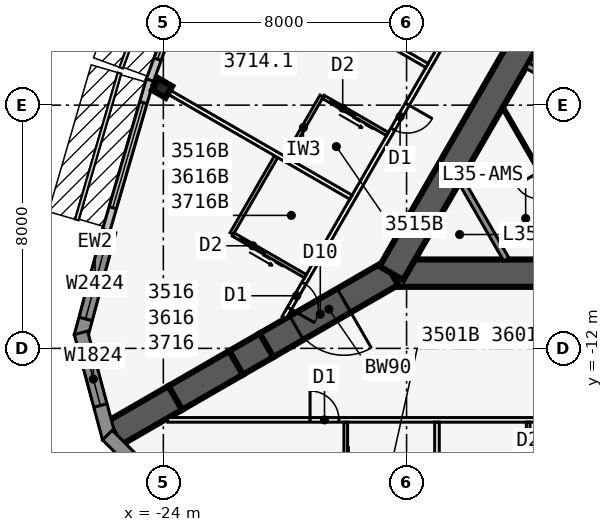
"""IFC4 building model, lengths in metres.
Left out: names, types, materials, properties, quantities, classifications, styles, units other than length and angle.
Written with IfcOpenShell. Run it as: python <this file> out.ifc"""

import sys

from ifc_helpers import new_model, si_unit, direction, frame, frame_2d, origin, origin_2d, place, context, subcontext, project, spatial, polyline, rectangle, i_section, outline, extrude, element, fill, save


model = new_model("IFC4")
c1 = context("Model", 3, precision=1e-05, world=origin(), true_north=direction((0.0, 1.0)))
c2 = subcontext(c1, "Body", "Model", "MODEL_VIEW")
j1 = project(units=[si_unit("LENGTHUNIT", "METRE"), si_unit("PLANEANGLEUNIT", "RADIAN")], contexts=[c1])
p1 = place(None, origin())
s1 = spatial("IfcSite", under=j1, at=p1, CompositionType="ELEMENT")
p2 = place(p1, origin())
s2 = spatial("IfcBuilding", under=s1, at=p2, CompositionType="ELEMENT")
p3 = place(p2, frame((0.0, 0.0, 135.1)))
s3 = spatial("IfcBuildingStorey", under=s2, at=p3, CompositionType="ELEMENT", Elevation=135.1)
p4 = place(p3, frame((-16.5, -9.526, 0.0), z_axis=(0.0, 0.0, 1.0), x_axis=(1.0, 0.0, 0.0)))
e1 = element("IfcWall", 1, at=p4, inside=s3, PredefinedType="SHEAR", context=c2, shape_type="SweptSolid", body=[
    extrude(rectangle(XDim=33.0, YDim=0.9, at=frame_2d((16.5, 0.0))), origin(), (0.0, 0.0, 1.0), 3.4),
])
p5 = place(p4, frame((14.05, 0.0, 0.0)))
e2 = element("IfcOpeningElement", 2, at=p5, cuts=e1, PredefinedType="OPENING", context=c2, shape_type="SweptSolid", body=[
    extrude(rectangle(XDim=1.8, YDim=2.13, at=frame_2d((0.9, 1.065))), frame((0.0, 0.46, 0.0), z_axis=(0.0, -1.0, 0.0), x_axis=(1.0, 0.0, 0.0)), (0.0, 0.0, 1.0), 0.92),
])
p6 = place(p3, frame((0.0, 19.052, 0.0), z_axis=(0.0, 0.0, 1.0), x_axis=(-0.499999749417, -0.866025548458, 0.0)))
e3 = element("IfcWall", 3, at=p6, inside=s3, PredefinedType="SHEAR", context=c2, shape_type="SweptSolid", body=[
    extrude(rectangle(XDim=33.0, YDim=0.9, at=frame_2d((16.5, 0.0))), origin(), (0.0, 0.0, 1.0), 3.4),
])
p7 = place(p6, frame((14.15, 0.0, 0.0)))
e4 = element("IfcOpeningElement", 4, at=p7, cuts=e3, PredefinedType="OPENING", context=c2, shape_type="SweptSolid", body=[
    extrude(rectangle(XDim=1.8, YDim=2.13, at=frame_2d((0.9, 1.065))), frame((0.0, 0.46, 0.0), z_axis=(0.0, -1.0, 0.0), x_axis=(1.0, 0.0, 0.0)), (0.0, 0.0, 1.0), 0.92),
])
p8 = place(p6, frame((12.6, 0.0, 0.0)))
e5 = element("IfcOpeningElement", 5, at=p8, cuts=e3, PredefinedType="OPENING", context=c2, shape_type="SweptSolid", body=[
    extrude(rectangle(XDim=1.0, YDim=2.13, at=frame_2d((0.5, 1.065))), frame((0.0, 0.46, 0.0), z_axis=(0.0, -1.0, 0.0), x_axis=(1.0, 0.0, 0.0)), (0.0, 0.0, 1.0), 0.92),
])
p9 = place(p3, frame((-9.329, -4.256, 0.0), z_axis=(0.0, 0.0, 1.0), x_axis=(-0.866022959057, 0.500004234368, 0.0)))
e6 = element("IfcWall", 6, at=p9, inside=s3, PredefinedType="SOLIDWALL", context=c2, shape_type="SweptSolid", body=[
    extrude(rectangle(XDim=3.125, YDim=0.2, at=frame_2d((1.562, 0.0))), origin(), (0.0, 0.0, 1.0), 3.235),
])
p10 = place(p3, frame((-16.5, -9.526, 0.0), z_axis=(0.0, 0.0, 1.0), x_axis=(-0.866031398331, -0.499989616998, 0.0)))
e7 = element("IfcWall", 7, at=p10, inside=s3, PredefinedType="SHEAR", context=c2, shape_type="SweptSolid", body=[
    extrude(rectangle(XDim=4.746, YDim=0.9, at=frame_2d((2.373, 0.0))), origin(), (0.0, 0.0, 1.0), 3.4),
])
p11 = place(p10, frame((1.8, 0.0, 0.0)))
e8 = element("IfcOpeningElement", 8, at=p11, cuts=e7, PredefinedType="OPENING", context=c2, shape_type="SweptSolid", body=[
    extrude(rectangle(XDim=1.8, YDim=2.13, at=frame_2d((0.9, 1.065))), frame((0.0, 0.46, 0.0), z_axis=(0.0, -1.0, 0.0), x_axis=(1.0, 0.0, 0.0)), (0.0, 0.0, 1.0), 0.92),
])
p12 = place(p3, frame((-20.61, -11.899, 0.0), z_axis=(0.0, 0.0, 1.0), x_axis=(-0.866009537788, -0.500027479704, 0.0)))
e9 = element("IfcWall", 9, at=p12, inside=s3, PredefinedType="SHEAR", context=c2, shape_type="SweptSolid", body=[
    extrude(rectangle(XDim=1.155, YDim=0.9, at=frame_2d((0.577, 0.0))), origin(), (0.0, 0.0, 1.0), 3.4),
])
for number, where, z_axis, x_axis in (
    (10, (-21.61, -12.477, 0.0), (0.0, 0.0, 1.0), (-0.866, -0.5, 0.0)),
    (11, (-23.61, -13.631, 0.0), (0.0, 0.0, 1.0), (-0.866, -0.5, 0.0)),
):
    element("IfcWall", number, at=place(p3, frame(where, z_axis=z_axis, x_axis=x_axis)), inside=s3, PredefinedType="SHEAR", context=c2, shape_type="SweptSolid", body=[
        extrude(rectangle(XDim=2.309, YDim=0.9, at=frame_2d((1.155, 0.0))), origin(), (0.0, 0.0, 1.0), 3.4),
    ])
p13 = place(p3, frame((-24.041, -3.44, 0.0), z_axis=(0.0, 0.0, 1.0), x_axis=(-0.5, -0.866025403784, 0.0)))
e12 = element("IfcColumn", 12, at=p13, inside=s3, PredefinedType="COLUMN", context=c2, shape_type="SweptSolid", body=[
    extrude(i_section(OverallWidth=0.437, OverallDepth=0.513, WebThickness=0.061, FlangeThickness=0.097, at=origin_2d()), origin(), (0.0, 0.0, 1.0), 3.4),
])
p14 = place(p3, frame((-22.701, 1.584, 0.0), z_axis=(0.0, 0.0, 1.0), x_axis=(-0.343225593282, -0.939252996863, 0.0)))
e13 = element("IfcWall", 13, at=p14, inside=s3, PredefinedType="STANDARD", context=c2, shape_type="SweptSolid", body=[
    extrude(rectangle(XDim=5.076, YDim=0.25, at=frame_2d((2.538, 0.0))), origin(), (0.0, 0.0, 1.0), 3.235),
])
p15 = place(p14, frame((0.738, 0.0, 0.45)))
e14 = element("IfcOpeningElement", 14, at=p15, cuts=e13, PredefinedType="OPENING", context=c2, shape_type="SweptSolid", body=[
    extrude(rectangle(XDim=3.6, YDim=2.4, at=frame_2d((1.8, 1.2))), frame((0.0, 0.135, 0.0), z_axis=(0.0, -1.0, 0.0), x_axis=(1.0, 0.0, 0.0)), (0.0, 0.0, 1.0), 0.27),
])
p16 = place(p3, frame((-24.441, -3.175, 0.0), z_axis=(0.0, 0.0, 1.0), x_axis=(-0.279528287117, -0.960137457191, 0.0)))
e15 = element("IfcWall", 15, at=p16, inside=s3, PredefinedType="STANDARD", context=c2, shape_type="SweptSolid", body=[
    extrude(rectangle(XDim=5.148, YDim=0.25, at=frame_2d((2.574, 0.0))), origin(), (0.0, 0.0, 1.0), 3.235),
])
p17 = place(p16, frame((0.774, 0.0, 0.45)))
e16 = element("IfcOpeningElement", 16, at=p17, cuts=e15, PredefinedType="OPENING", context=c2, shape_type="SweptSolid", body=[
    extrude(rectangle(XDim=3.6, YDim=2.4, at=frame_2d((1.8, 1.2))), frame((0.0, 0.135, 0.0), z_axis=(0.0, -1.0, 0.0), x_axis=(1.0, 0.0, 0.0)), (0.0, 0.0, 1.0), 0.27),
])
p18 = place(p3, frame((-25.783, -8.141, 0.0), z_axis=(0.0, 0.0, 1.0), x_axis=(-0.258823421857, -0.965924653531, 0.0)))
e17 = element("IfcWall", 17, at=p18, inside=s3, PredefinedType="SOLIDWALL", context=c2, shape_type="SweptSolid", body=[
    extrude(rectangle(XDim=3.586, YDim=0.45, at=frame_2d((1.793, 0.0))), origin(), (0.0, 0.0, 1.0), 3.235),
])
p19 = place(p18, frame((0.593, 0.0, 0.45)))
e18 = element("IfcOpeningElement", 18, at=p19, cuts=e17, PredefinedType="OPENING", context=c2, shape_type="SweptSolid", body=[
    extrude(rectangle(XDim=2.4, YDim=2.4, at=frame_2d((1.2, 1.2))), frame((0.0, 0.235, 0.0), z_axis=(0.0, -1.0, 0.0), x_axis=(1.0, 0.0, 0.0)), (0.0, 0.0, 1.0), 0.47),
])
p20 = place(p3, frame((-26.711, -11.489, 0.0), z_axis=(0.0, 0.0, 1.0), x_axis=(0.258823421857, -0.965924653531, 0.0)))
e19 = element("IfcWall", 19, at=p20, inside=s3, PredefinedType="SOLIDWALL", context=c2, shape_type="SweptSolid", body=[
    extrude(outline(polyline([(3.586, 0.225), (3.527, 0.225), (3.035, 0.093), (3.0, 0.225), (0.0, 0.225), (0.0, -0.225), (3.586, -0.225), (3.586, 0.225)])), origin(), (0.0, 0.0, 1.0), 3.235),
])
p21 = place(p20, frame((0.675, 0.0, 0.45)))
e20 = element("IfcOpeningElement", 20, at=p21, cuts=e19, PredefinedType="OPENING", context=c2, shape_type="SweptSolid", body=[
    extrude(rectangle(XDim=1.8, YDim=2.4, at=frame_2d((0.9, 1.2))), frame((0.0, 0.235, 0.0), z_axis=(0.0, -1.0, 0.0), x_axis=(1.0, 0.0, 0.0)), (0.0, 0.0, 1.0), 0.47),
])
p22 = place(p3, frame((-25.841, -14.852, 0.0), z_axis=(0.0, 0.0, 1.0), x_axis=(0.707106781187, -0.707106781187, 0.0)))
e21 = element("IfcWall", 21, at=p22, inside=s3, PredefinedType="SOLIDWALL", context=c2, shape_type="SweptSolid", body=[
    extrude(outline(polyline([(3.586, 0.225), (0.586, 0.225), (0.551, 0.093), (0.059, 0.225), (0.0, 0.225), (0.0, -0.225), (3.586, -0.225), (3.586, 0.225)])), origin(), (0.0, 0.0, 1.0), 3.235),
])
p23 = place(p22, frame((1.111, 0.0, 0.45)))
e22 = element("IfcOpeningElement", 22, at=p23, cuts=e21, PredefinedType="OPENING", context=c2, shape_type="SweptSolid", body=[
    extrude(rectangle(XDim=1.8, YDim=2.4, at=frame_2d((0.9, 1.2))), frame((0.0, 0.235, 0.0), z_axis=(0.0, -1.0, 0.0), x_axis=(1.0, 0.0, 0.0)), (0.0, 0.0, 1.0), 0.47),
])
p24 = place(p3, frame((-23.857, -14.351, 0.0), z_axis=(0.0, 0.0, 1.0), x_axis=(1.0, 0.0, 0.0)))
e23 = element("IfcWall", 23, at=p24, inside=s3, PredefinedType="PARTITIONING", context=c2, shape_type="SweptSolid", body=[
    extrude(rectangle(XDim=47.714, YDim=0.15, at=frame_2d((23.857, 0.0))), origin(), (0.0, 0.0, 1.0), 3.235),
])
p25 = place(p24, frame((4.682, 0.0, 0.0)))
e24 = element("IfcOpeningElement", 24, at=p25, cuts=e23, PredefinedType="OPENING", context=c2, shape_type="SweptSolid", body=[
    extrude(rectangle(XDim=0.95, YDim=2.13, at=frame_2d((0.475, 1.065))), frame((0.0, 0.085, 0.0), z_axis=(0.0, -1.0, 0.0), x_axis=(1.0, 0.0, 0.0)), (0.0, 0.0, 1.0), 0.17),
])
p26 = place(p24, frame((15.882, 0.0, 0.0)))
e25 = element("IfcOpeningElement", 25, at=p26, cuts=e23, PredefinedType="OPENING", context=c2, shape_type="SweptSolid", body=[
    extrude(rectangle(XDim=0.95, YDim=2.13, at=frame_2d((0.475, 1.065))), frame((0.0, 0.085, 0.0), z_axis=(0.0, -1.0, 0.0), x_axis=(1.0, 0.0, 0.0)), (0.0, 0.0, 1.0), 0.17),
])
p27 = place(p24, frame((25.857, 0.0, 0.0)))
e26 = element("IfcOpeningElement", 26, at=p27, cuts=e23, PredefinedType="OPENING", context=c2, shape_type="SweptSolid", body=[
    extrude(rectangle(XDim=1.0, YDim=2.13, at=frame_2d((0.5, 1.065))), frame((0.0, 0.085, 0.0), z_axis=(0.0, -1.0, 0.0), x_axis=(1.0, 0.0, 0.0)), (0.0, 0.0, 1.0), 0.17),
])
p28 = place(p24, frame((30.282, 0.0, 0.0)))
e27 = element("IfcOpeningElement", 27, at=p28, cuts=e23, PredefinedType="OPENING", context=c2, shape_type="SweptSolid", body=[
    extrude(rectangle(XDim=0.95, YDim=2.13, at=frame_2d((0.475, 1.065))), frame((0.0, 0.085, 0.0), z_axis=(0.0, -1.0, 0.0), x_axis=(1.0, 0.0, 0.0)), (0.0, 0.0, 1.0), 0.17),
])
p29 = place(p24, frame((43.041, 0.0, 0.0)))
e28 = element("IfcOpeningElement", 28, at=p29, cuts=e23, PredefinedType="OPENING", context=c2, shape_type="SweptSolid", body=[
    extrude(rectangle(XDim=0.95, YDim=2.13, at=frame_2d((0.475, 1.065))), frame((0.0, 0.085, 0.0), z_axis=(0.0, -1.0, 0.0), x_axis=(1.0, 0.0, 0.0)), (0.0, 0.0, 1.0), 0.17),
])
p30 = place(p3, frame((-15.0, -14.426, 0.0), z_axis=(0.0, 0.0, 1.0), x_axis=(0.0, -1.0, 0.0)))
e29 = element("IfcWall", 29, at=p30, inside=s3, PredefinedType="PARTITIONING", context=c2, shape_type="SweptSolid", body=[
    extrude(rectangle(XDim=5.017, YDim=0.15, at=frame_2d((2.508, 0.0))), origin(), (0.0, 0.0, 1.0), 2.389),
])
p31 = place(p3, frame((-18.0, -14.426, 0.0), z_axis=(0.0, 0.0, 1.0), x_axis=(0.0, -1.0, 0.0)))
e30 = element("IfcWall", 30, at=p31, inside=s3, PredefinedType="PLUMBINGWALL", context=c2, shape_type="SweptSolid", body=[
    extrude(rectangle(XDim=2.74, YDim=0.12, at=frame_2d((1.37, 0.0))), origin(), (0.0, 0.0, 1.0), 3.235),
])
p32 = place(p31, frame((1.55, 0.0, 0.0)))
e31 = element("IfcOpeningElement", 31, at=p32, cuts=e30, PredefinedType="OPENING", context=c2, shape_type="SweptSolid", body=[
    extrude(rectangle(XDim=0.9, YDim=2.13, at=frame_2d((0.45, 1.065))), frame((0.0, 0.07, 0.0), z_axis=(0.0, -1.0, 0.0), x_axis=(1.0, 0.0, 0.0)), (0.0, 0.0, 1.0), 0.14),
])
p33 = place(p3, frame((-12.0, -14.426, 0.0), z_axis=(0.0, 0.0, 1.0), x_axis=(0.0, -1.0, 0.0)))
e32 = element("IfcWall", 32, at=p33, inside=s3, PredefinedType="PLUMBINGWALL", context=c2, shape_type="SweptSolid", body=[
    extrude(rectangle(XDim=2.74, YDim=0.12, at=frame_2d((1.37, 0.0))), origin(), (0.0, 0.0, 1.0), 3.235),
])
p34 = place(p33, frame((1.55, 0.0, 0.0)))
e33 = element("IfcOpeningElement", 33, at=p34, cuts=e32, PredefinedType="OPENING", context=c2, shape_type="SweptSolid", body=[
    extrude(rectangle(XDim=0.9, YDim=2.13, at=frame_2d((0.45, 1.065))), frame((0.0, 0.07, 0.0), z_axis=(0.0, -1.0, 0.0), x_axis=(1.0, 0.0, 0.0)), (0.0, 0.0, 1.0), 0.14),
])
p35 = place(p3, frame((-0.5, 22.836, 0.0), z_axis=(0.0, 0.0, 1.0), x_axis=(-0.500001677587, -0.866024435227, 0.0)))
e34 = element("IfcWall", 34, at=p35, inside=s3, PredefinedType="PARTITIONING", context=c2, shape_type="SweptSolid", body=[
    extrude(rectangle(XDim=39.054, YDim=0.15, at=frame_2d((19.527, 0.0))), origin(), (0.0, 0.0, 1.0), 3.235),
])
p36 = place(p35, frame((1.558, 0.0, 0.0)))
e35 = element("IfcOpeningElement", 35, at=p36, cuts=e34, PredefinedType="OPENING", context=c2, shape_type="SweptSolid", body=[
    extrude(rectangle(XDim=0.95, YDim=2.13, at=frame_2d((0.475, 1.065))), frame((0.0, 0.085, 0.0), z_axis=(0.0, -1.0, 0.0), x_axis=(1.0, 0.0, 0.0)), (0.0, 0.0, 1.0), 0.17),
])
p37 = place(p35, frame((10.952, 0.0, 0.0)))
e36 = element("IfcOpeningElement", 36, at=p37, cuts=e34, PredefinedType="OPENING", context=c2, shape_type="SweptSolid", body=[
    extrude(rectangle(XDim=0.95, YDim=2.13, at=frame_2d((0.475, 1.065))), frame((0.0, 0.085, 0.0), z_axis=(0.0, -1.0, 0.0), x_axis=(1.0, 0.0, 0.0)), (0.0, 0.0, 1.0), 0.17),
])
p38 = place(p35, frame((17.752, 0.0, 0.0)))
e37 = element("IfcOpeningElement", 37, at=p38, cuts=e34, PredefinedType="OPENING", context=c2, shape_type="SweptSolid", body=[
    extrude(rectangle(XDim=0.95, YDim=2.13, at=frame_2d((0.475, 1.065))), frame((0.0, 0.085, 0.0), z_axis=(0.0, -1.0, 0.0), x_axis=(1.0, 0.0, 0.0)), (0.0, 0.0, 1.0), 0.17),
])
p39 = place(p35, frame((21.552, 0.0, 0.0)))
e38 = element("IfcOpeningElement", 38, at=p39, cuts=e34, PredefinedType="OPENING", context=c2, shape_type="SweptSolid", body=[
    extrude(rectangle(XDim=0.95, YDim=2.13, at=frame_2d((0.475, 1.065))), frame((0.0, 0.085, 0.0), z_axis=(0.0, -1.0, 0.0), x_axis=(1.0, 0.0, 0.0)), (0.0, 0.0, 1.0), 0.17),
])
p40 = place(p35, frame((30.952, 0.0, 0.0)))
e39 = element("IfcOpeningElement", 39, at=p40, cuts=e34, PredefinedType="OPENING", context=c2, shape_type="SweptSolid", body=[
    extrude(rectangle(XDim=0.95, YDim=2.13, at=frame_2d((0.475, 1.065))), frame((0.0, 0.085, 0.0), z_axis=(0.0, -1.0, 0.0), x_axis=(1.0, 0.0, 0.0)), (0.0, 0.0, 1.0), 0.17),
])
p41 = place(p35, frame((37.752, 0.0, 0.0)))
e40 = element("IfcOpeningElement", 40, at=p41, cuts=e34, PredefinedType="OPENING", context=c2, shape_type="SweptSolid", body=[
    extrude(rectangle(XDim=0.95, YDim=2.13, at=frame_2d((0.475, 1.065))), frame((0.0, 0.085, 0.0), z_axis=(0.0, -1.0, 0.0), x_axis=(1.0, 0.0, 0.0)), (0.0, 0.0, 1.0), 0.17),
])
p42 = place(p3, frame((-15.329, -2.697, 0.0), z_axis=(0.0, 0.0, 1.0), x_axis=(-0.866024316602, 0.50000188305, 0.0)))
e41 = element("IfcWall", 41, at=p42, inside=s3, PredefinedType="PARTITIONING", context=c2, shape_type="SweptSolid", body=[
    extrude(rectangle(XDim=8.395, YDim=0.15, at=frame_2d((4.198, 0.0))), origin(), (0.0, 0.0, 1.0), 2.389),
])
p43 = place(p3, frame((-17.829, -7.027, 0.0), z_axis=(0.0, 0.0, 1.0), x_axis=(-0.866029804378, 0.499992377871, 0.0)))
e42 = element("IfcWall", 42, at=p43, inside=s3, PredefinedType="PARTITIONING", context=c2, shape_type="SweptSolid", body=[
    extrude(rectangle(XDim=7.516, YDim=0.15, at=frame_2d((3.758, 0.0))), origin(), (0.0, 0.0, 1.0), 2.389),
])
p44 = place(p3, frame((-18.793, -3.699, 0.0), z_axis=(0.0, 0.0, 1.0), x_axis=(-0.500001309137, -0.866024647952, 0.0)))
e43 = element("IfcWall", 43, at=p44, inside=s3, PredefinedType="PLUMBINGWALL", context=c2, shape_type="SweptSolid", body=[
    extrude(rectangle(XDim=2.4, YDim=0.12, at=frame_2d((1.2, 0.0))), origin(), (0.0, 0.0, 1.0), 3.235),
])
p45 = place(p3, frame((-16.628, -4.949, 0.0), z_axis=(0.0, 0.0, 1.0), x_axis=(-0.866048967903, 0.499959183527, 0.0)))
e44 = element("IfcWall", 44, at=p45, inside=s3, PredefinedType="PLUMBINGWALL", context=c2, shape_type="SweptSolid", body=[
    extrude(rectangle(XDim=2.44, YDim=0.12, at=frame_2d((1.22, 0.0))), origin(), (0.0, 0.0, 1.0), 3.235),
])
p46 = place(p45, frame((1.25, 0.0, 0.0)))
e45 = element("IfcOpeningElement", 45, at=p46, cuts=e44, PredefinedType="OPENING", context=c2, shape_type="SweptSolid", body=[
    extrude(rectangle(XDim=0.9, YDim=2.13, at=frame_2d((0.45, 1.065))), frame((0.0, 0.07, 0.0), z_axis=(0.0, -1.0, 0.0), x_axis=(1.0, 0.0, 0.0)), (0.0, 0.0, 1.0), 0.14),
])
p47 = place(p3, frame((-20.253, -5.627, 0.0), z_axis=(0.0, 0.0, 1.0), x_axis=(-0.499990139034, -0.866031096941, 0.0)))
e46 = element("IfcWall", 46, at=p47, inside=s3, PredefinedType="PLUMBINGWALL", context=c2, shape_type="SweptSolid", body=[
    extrude(rectangle(XDim=3.0, YDim=0.12, at=frame_2d((1.5, 0.0))), origin(), (0.0, 0.0, 1.0), 3.235),
])
p48 = place(p3, frame((-19.329, -9.625, 0.0), z_axis=(0.0, 0.0, 1.0), x_axis=(-0.866035715982, 0.499982138324, 0.0)))
e47 = element("IfcWall", 47, at=p48, inside=s3, PredefinedType="PLUMBINGWALL", context=c2, shape_type="SweptSolid", body=[
    extrude(rectangle(XDim=2.74, YDim=0.12, at=frame_2d((1.37, 0.0))), origin(), (0.0, 0.0, 1.0), 3.235),
])
p49 = place(p48, frame((1.55, 0.0, 0.0)))
e48 = element("IfcOpeningElement", 48, at=p49, cuts=e47, PredefinedType="OPENING", context=c2, shape_type="SweptSolid", body=[
    extrude(rectangle(XDim=0.9, YDim=2.13, at=frame_2d((0.45, 1.065))), frame((0.0, 0.07, 0.0), z_axis=(0.0, -1.0, 0.0), x_axis=(1.0, 0.0, 0.0)), (0.0, 0.0, 1.0), 0.14),
])
p50 = place(p3, frame((-12.719, -9.076, 0.0), z_axis=(0.0, 0.0, 1.0), x_axis=(-0.499952404951, 0.866052881055, 0.0)))
e49 = element("IfcWall", 49, at=p50, inside=s3, PredefinedType="SOLIDWALL", context=c2, shape_type="SweptSolid", body=[
    extrude(rectangle(XDim=3.002, YDim=0.2, at=frame_2d((1.501, 0.0))), origin(), (0.0, 0.0, 1.0), 3.235),
])
p51 = place(p3, frame((-9.947, -9.076, 0.0), z_axis=(0.0, 0.0, 1.0), x_axis=(-0.500027479704, 0.866009537788, 0.0)))
e50 = element("IfcWall", 50, at=p51, inside=s3, PredefinedType="PARTITIONING", context=c2, shape_type="SweptSolid", body=[
    extrude(rectangle(XDim=5.774, YDim=0.1, at=frame_2d((2.887, 0.0))), origin(), (0.0, 0.0, 1.0), 3.235),
])
p52 = place(p51, frame((2.437, 0.0, 0.0)))
e51 = element("IfcOpeningElement", 51, at=p52, cuts=e50, PredefinedType="OPENING", context=c2, shape_type="SweptSolid", body=[
    extrude(rectangle(XDim=0.9, YDim=2.13, at=frame_2d((0.45, 1.065))), frame((0.0, 0.06, 0.0), z_axis=(0.0, -1.0, 0.0), x_axis=(1.0, 0.0, 0.0)), (0.0, 0.0, 1.0), 0.12),
])
p53 = place(p15, origin())
e52 = element("IfcWindow", 52, at=p53, inside=s3, PartitioningType="SINGLE_PANEL", PredefinedType="WINDOW", context=c2, shape_type="SweptSolid", body=[
    extrude(rectangle(XDim=3.6, YDim=2.4, at=frame_2d((1.8, 1.2))), frame((0.0, 0.03, 0.0), z_axis=(0.0, -1.0, 0.0), x_axis=(1.0, 0.0, 0.0)), (0.0, 0.0, 1.0), 0.06),
])
fill(e14, e52)
p54 = place(p17, origin())
e53 = element("IfcWindow", 53, at=p54, inside=s3, PartitioningType="SINGLE_PANEL", PredefinedType="WINDOW", context=c2, shape_type="SweptSolid", body=[
    extrude(rectangle(XDim=3.6, YDim=2.4, at=frame_2d((1.8, 1.2))), frame((0.0, 0.03, 0.0), z_axis=(0.0, -1.0, 0.0), x_axis=(1.0, 0.0, 0.0)), (0.0, 0.0, 1.0), 0.06),
])
fill(e16, e53)
p55 = place(p19, origin())
e54 = element("IfcWindow", 54, at=p55, inside=s3, PartitioningType="SINGLE_PANEL", PredefinedType="WINDOW", context=c2, shape_type="SweptSolid", body=[
    extrude(rectangle(XDim=2.4, YDim=2.4, at=frame_2d((1.2, 1.2))), frame((0.0, 0.03, 0.0), z_axis=(0.0, -1.0, 0.0), x_axis=(1.0, 0.0, 0.0)), (0.0, 0.0, 1.0), 0.06),
])
fill(e18, e54)
p56 = place(p21, origin())
e55 = element("IfcWindow", 55, at=p56, inside=s3, PartitioningType="SINGLE_PANEL", PredefinedType="WINDOW", context=c2, shape_type="SweptSolid", body=[
    extrude(rectangle(XDim=1.8, YDim=2.4, at=frame_2d((0.9, 1.2))), frame((0.0, 0.03, 0.0), z_axis=(0.0, -1.0, 0.0), x_axis=(1.0, 0.0, 0.0)), (0.0, 0.0, 1.0), 0.06),
])
fill(e20, e55)
p57 = place(p25, origin())
e56 = element("IfcDoor", 56, at=p57, inside=s3, OperationType="SINGLE_SWING_LEFT", PredefinedType="DOOR", context=c2, shape_type="SweptSolid", body=[
    extrude(rectangle(XDim=0.95, YDim=2.13, at=frame_2d((0.475, 1.065))), frame((0.0, 0.025, 0.0), z_axis=(0.0, -1.0, 0.0), x_axis=(1.0, 0.0, 0.0)), (0.0, 0.0, 1.0), 0.05),
])
fill(e24, e56)
p58 = place(p46, origin())
e57 = element("IfcDoor", 57, at=p58, inside=s3, OperationType="SLIDING_TO_LEFT", PredefinedType="DOOR", context=c2, shape_type="SweptSolid", body=[
    extrude(rectangle(XDim=0.9, YDim=2.13, at=frame_2d((0.45, 1.065))), frame((0.0, 0.025, 0.0), z_axis=(0.0, -1.0, 0.0), x_axis=(1.0, 0.0, 0.0)), (0.0, 0.0, 1.0), 0.05),
])
fill(e45, e57)
p59 = place(p40, origin())
e58 = element("IfcDoor", 58, at=p59, inside=s3, OperationType="SINGLE_SWING_LEFT", PredefinedType="DOOR", context=c2, shape_type="SweptSolid", body=[
    extrude(rectangle(XDim=0.95, YDim=2.13, at=frame_2d((0.475, 1.065))), frame((0.0, 0.025, 0.0), z_axis=(0.0, -1.0, 0.0), x_axis=(1.0, 0.0, 0.0)), (0.0, 0.0, 1.0), 0.05),
])
fill(e39, e58)
p60 = place(p49, origin())
e59 = element("IfcDoor", 59, at=p60, inside=s3, OperationType="SLIDING_TO_LEFT", PredefinedType="DOOR", context=c2, shape_type="SweptSolid", body=[
    extrude(rectangle(XDim=0.9, YDim=2.13, at=frame_2d((0.45, 1.065))), frame((0.0, 0.025, 0.0), z_axis=(0.0, -1.0, 0.0), x_axis=(1.0, 0.0, 0.0)), (0.0, 0.0, 1.0), 0.05),
])
fill(e48, e59)
p61 = place(p41, origin())
e60 = element("IfcDoor", 60, at=p61, inside=s3, OperationType="SINGLE_SWING_RIGHT", PredefinedType="DOOR", context=c2, shape_type="SweptSolid", body=[
    extrude(rectangle(XDim=0.95, YDim=2.13, at=frame_2d((0.475, 1.065))), frame((0.0, 0.025, 0.0), z_axis=(0.0, -1.0, 0.0), x_axis=(1.0, 0.0, 0.0)), (0.0, 0.0, 1.0), 0.05),
])
fill(e40, e60)
p62 = place(p11, origin())
e61 = element("IfcDoor", 61, at=p62, inside=s3, OperationType="DOUBLE_DOOR_DOUBLE_SWING", PredefinedType="DOOR", context=c2, shape_type="SweptSolid", body=[
    extrude(rectangle(XDim=1.8, YDim=2.13, at=frame_2d((0.9, 1.065))), frame((0.0, 0.025, 0.0), z_axis=(0.0, -1.0, 0.0), x_axis=(1.0, 0.0, 0.0)), (0.0, 0.0, 1.0), 0.05),
])
fill(e8, e61)
save(model, sys.argv[1])
